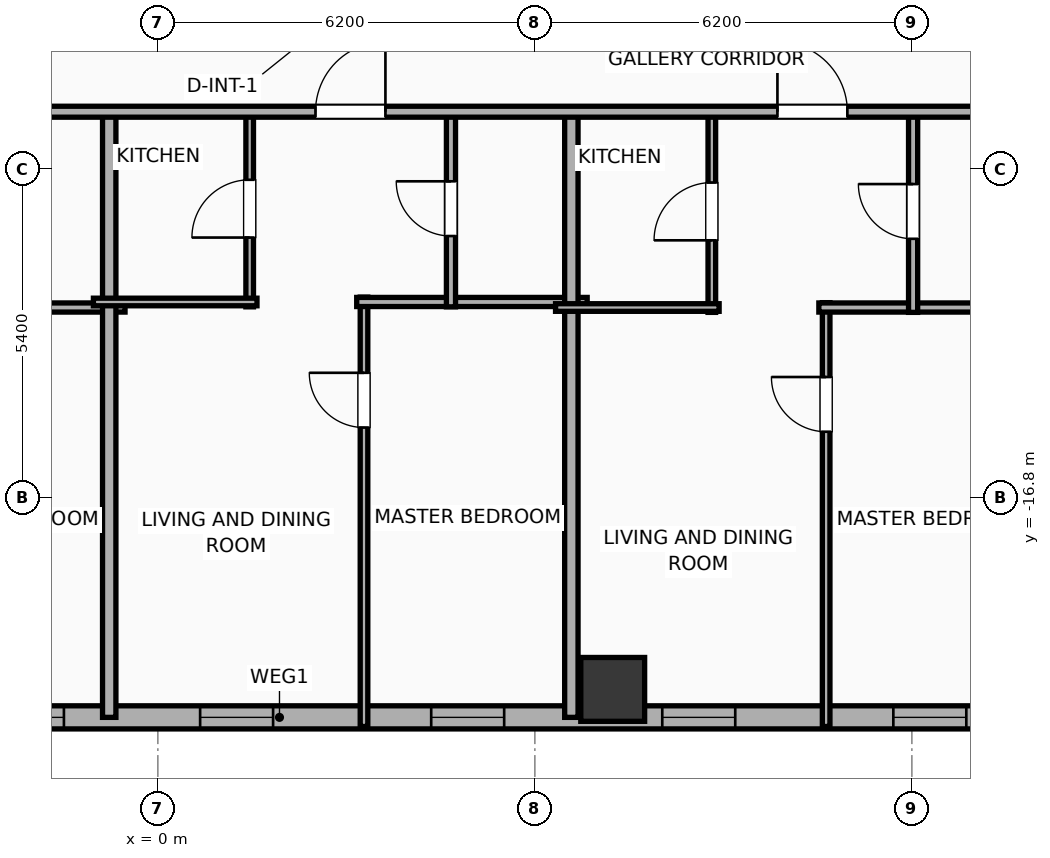
"""IFC4 building model, lengths in metres.
Left out: names, types, materials, properties, quantities, classifications, styles, units other than length and angle.
Written with IfcOpenShell. Run it as: python <this file> out.ifc"""

import sys

from ifc_helpers import new_model, si_unit, direction, frame, frame_2d, origin, origin_2d, place, context, subcontext, project, spatial, rectangle, hollow_rectangle, extrude, element, fill, save


model = new_model("IFC4")
c1 = context("Model", 3, precision=1e-05, world=origin(), true_north=direction((0.0, 1.0)))
c2 = subcontext(c1, "Body", "Model", "MODEL_VIEW")
j1 = project(units=[si_unit("LENGTHUNIT", "METRE"), si_unit("PLANEANGLEUNIT", "RADIAN")], contexts=[c1])
p1 = place(None, origin())
s1 = spatial("IfcSite", under=j1, at=p1, CompositionType="ELEMENT")
p2 = place(p1, origin())
s2 = spatial("IfcBuilding", under=s1, at=p2, CompositionType="ELEMENT")
p3 = place(p2, frame((0.0, 0.0, 93.6)))
s3 = spatial("IfcBuildingStorey", under=s2, at=p3, CompositionType="ELEMENT", Elevation=93.6)
p4 = place(p3, frame((7.48, -19.95, 0.0), z_axis=(0.0, 0.0, 1.0), x_axis=(1.0, 0.0, 0.0)))
e1 = element("IfcColumn", 1, at=p4, inside=s3, PredefinedType="COLUMN", context=c2, shape_type="SweptSolid", body=[
    extrude(hollow_rectangle(XDim=1.05, YDim=1.05, WallThickness=0.036, at=origin_2d()), origin(), (0.0, 0.0, 1.0), 3.9),
])
p5 = place(p3, frame((29.381, -20.41, 0.0), z_axis=(0.0, 0.0, 1.0), x_axis=(-1.0, 0.0, 0.0)))
e2 = element("IfcWall", 2, at=p5, inside=s3, PredefinedType="ELEMENTEDWALL", context=c2, shape_type="SweptSolid", body=[
    extrude(rectangle(XDim=54.763, YDim=0.38, at=frame_2d((27.381, 0.0))), origin(), (0.0, 0.0, 1.0), 3.65),
])
p6 = place(p5, frame((4.795, 0.0, 0.75)))
e3 = element("IfcOpeningElement", 3, at=p6, cuts=e2, PredefinedType="OPENING", context=c2, shape_type="SweptSolid", body=[
    extrude(rectangle(XDim=2.4, YDim=2.1, at=frame_2d((1.2, 1.05))), frame((0.0, 0.2, 0.0), z_axis=(0.0, -1.0, 0.0), x_axis=(1.0, 0.0, 0.0)), (0.0, 0.0, 1.0), 0.4),
])
p7 = place(p5, frame((33.877, 0.0, 0.75)))
e4 = element("IfcOpeningElement", 4, at=p7, cuts=e2, PredefinedType="OPENING", context=c2, shape_type="SweptSolid", body=[
    extrude(rectangle(XDim=2.4, YDim=2.1, at=frame_2d((1.2, 1.05))), frame((0.0, 0.2, 0.0), z_axis=(0.0, -1.0, 0.0), x_axis=(1.0, 0.0, 0.0)), (0.0, 0.0, 1.0), 0.4),
])
p8 = place(p5, frame((45.867, 0.0, 0.75)))
e5 = element("IfcOpeningElement", 5, at=p8, cuts=e2, PredefinedType="OPENING", context=c2, shape_type="SweptSolid", body=[
    extrude(rectangle(XDim=2.4, YDim=2.1, at=frame_2d((1.2, 1.05))), frame((0.0, 0.2, 0.0), z_axis=(0.0, -1.0, 0.0), x_axis=(1.0, 0.0, 0.0)), (0.0, 0.0, 1.0), 0.4),
])
p9 = place(p5, frame((53.122, 0.0, 0.75)))
e6 = element("IfcOpeningElement", 6, at=p9, cuts=e2, PredefinedType="OPENING", context=c2, shape_type="SweptSolid", body=[
    extrude(rectangle(XDim=0.85, YDim=2.05, at=frame_2d((0.425, 1.025))), frame((0.0, 0.2, 0.0), z_axis=(0.0, -1.0, 0.0), x_axis=(1.0, 0.0, 0.0)), (0.0, 0.0, 1.0), 0.4),
])
p10 = place(p5, frame((50.286, 0.0, 0.75)))
e7 = element("IfcOpeningElement", 7, at=p10, cuts=e2, PredefinedType="OPENING", context=c2, shape_type="SweptSolid", body=[
    extrude(rectangle(XDim=1.2, YDim=2.05, at=frame_2d((0.6, 1.025))), frame((0.0, 0.2, 0.0), z_axis=(0.0, -1.0, 0.0), x_axis=(1.0, 0.0, 0.0)), (0.0, 0.0, 1.0), 0.4),
])
p11 = place(p5, frame((41.846, 0.0, 0.75)))
e8 = element("IfcOpeningElement", 8, at=p11, cuts=e2, PredefinedType="OPENING", context=c2, shape_type="SweptSolid", body=[
    extrude(rectangle(XDim=1.2, YDim=2.05, at=frame_2d((0.6, 1.025))), frame((0.0, 0.2, 0.0), z_axis=(0.0, -1.0, 0.0), x_axis=(1.0, 0.0, 0.0)), (0.0, 0.0, 1.0), 0.4),
])
p12 = place(p5, frame((38.886, 0.0, 0.75)))
e9 = element("IfcOpeningElement", 9, at=p12, cuts=e2, PredefinedType="OPENING", context=c2, shape_type="SweptSolid", body=[
    extrude(rectangle(XDim=1.2, YDim=2.05, at=frame_2d((0.6, 1.025))), frame((0.0, 0.2, 0.0), z_axis=(0.0, -1.0, 0.0), x_axis=(1.0, 0.0, 0.0)), (0.0, 0.0, 1.0), 0.4),
])
p13 = place(p5, frame((30.926, 0.0, 0.75)))
e10 = element("IfcOpeningElement", 10, at=p13, cuts=e2, PredefinedType="OPENING", context=c2, shape_type="SweptSolid", body=[
    extrude(rectangle(XDim=1.2, YDim=2.05, at=frame_2d((0.6, 1.025))), frame((0.0, 0.2, 0.0), z_axis=(0.0, -1.0, 0.0), x_axis=(1.0, 0.0, 0.0)), (0.0, 0.0, 1.0), 0.4),
])
p14 = place(p5, frame((27.486, 0.0, 0.75)))
e11 = element("IfcOpeningElement", 11, at=p14, cuts=e2, PredefinedType="OPENING", context=c2, shape_type="SweptSolid", body=[
    extrude(rectangle(XDim=1.2, YDim=2.05, at=frame_2d((0.6, 1.025))), frame((0.0, 0.2, 0.0), z_axis=(0.0, -1.0, 0.0), x_axis=(1.0, 0.0, 0.0)), (0.0, 0.0, 1.0), 0.4),
])
p15 = place(p5, frame((23.686, 0.0, 0.75)))
e12 = element("IfcOpeningElement", 12, at=p15, cuts=e2, PredefinedType="OPENING", context=c2, shape_type="SweptSolid", body=[
    extrude(rectangle(XDim=1.2, YDim=2.05, at=frame_2d((0.6, 1.025))), frame((0.0, 0.2, 0.0), z_axis=(0.0, -1.0, 0.0), x_axis=(1.0, 0.0, 0.0)), (0.0, 0.0, 1.0), 0.4),
])
p16 = place(p5, frame((19.886, 0.0, 0.75)))
e13 = element("IfcOpeningElement", 13, at=p16, cuts=e2, PredefinedType="OPENING", context=c2, shape_type="SweptSolid", body=[
    extrude(rectangle(XDim=1.2, YDim=2.05, at=frame_2d((0.6, 1.025))), frame((0.0, 0.2, 0.0), z_axis=(0.0, -1.0, 0.0), x_axis=(1.0, 0.0, 0.0)), (0.0, 0.0, 1.0), 0.4),
])
p17 = place(p5, frame((16.086, 0.0, 0.75)))
e14 = element("IfcOpeningElement", 14, at=p17, cuts=e2, PredefinedType="OPENING", context=c2, shape_type="SweptSolid", body=[
    extrude(rectangle(XDim=1.2, YDim=2.05, at=frame_2d((0.6, 1.025))), frame((0.0, 0.2, 0.0), z_axis=(0.0, -1.0, 0.0), x_axis=(1.0, 0.0, 0.0)), (0.0, 0.0, 1.0), 0.4),
])
p18 = place(p5, frame((12.286, 0.0, 0.75)))
e15 = element("IfcOpeningElement", 15, at=p18, cuts=e2, PredefinedType="OPENING", context=c2, shape_type="SweptSolid", body=[
    extrude(rectangle(XDim=1.2, YDim=2.05, at=frame_2d((0.6, 1.025))), frame((0.0, 0.2, 0.0), z_axis=(0.0, -1.0, 0.0), x_axis=(1.0, 0.0, 0.0)), (0.0, 0.0, 1.0), 0.4),
])
p19 = place(p5, frame((8.486, 0.0, 0.75)))
e16 = element("IfcOpeningElement", 16, at=p19, cuts=e2, PredefinedType="OPENING", context=c2, shape_type="SweptSolid", body=[
    extrude(rectangle(XDim=1.2, YDim=2.05, at=frame_2d((0.6, 1.025))), frame((0.0, 0.2, 0.0), z_axis=(0.0, -1.0, 0.0), x_axis=(1.0, 0.0, 0.0)), (0.0, 0.0, 1.0), 0.4),
])
p20 = place(p5, frame((2.277, 0.0, 0.75)))
e17 = element("IfcOpeningElement", 17, at=p20, cuts=e2, PredefinedType="OPENING", context=c2, shape_type="SweptSolid", body=[
    extrude(rectangle(XDim=1.2, YDim=2.05, at=frame_2d((0.6, 1.025))), frame((0.0, 0.2, 0.0), z_axis=(0.0, -1.0, 0.0), x_axis=(1.0, 0.0, 0.0)), (0.0, 0.0, 1.0), 0.4),
])
p21 = place(p5, frame((1.071, 0.0, 0.75)))
e18 = element("IfcOpeningElement", 18, at=p21, cuts=e2, PredefinedType="OPENING", context=c2, shape_type="SweptSolid", body=[
    extrude(rectangle(XDim=0.52, YDim=2.05, at=frame_2d((0.26, 1.025))), frame((0.0, 0.2, 0.0), z_axis=(0.0, -1.0, 0.0), x_axis=(1.0, 0.0, 0.0)), (0.0, 0.0, 1.0), 0.4),
])
p22 = place(p3, frame((-4.33, -13.67, 0.0), z_axis=(0.0, 0.0, 1.0), x_axis=(1.0, 0.0, 0.0)))
e19 = element("IfcWall", 19, at=p22, inside=s3, PredefinedType="PLUMBINGWALL", context=c2, shape_type="SweptSolid", body=[
    extrude(rectangle(XDim=3.79, YDim=0.15, at=frame_2d((1.895, 0.0))), origin(), (0.0, 0.0, 1.0), 3.65),
])
p23 = place(p3, frame((-0.8, -20.41, 0.0), z_axis=(0.0, 0.0, 1.0), x_axis=(0.0, 1.0, 0.0)))
e20 = element("IfcWall", 20, at=p23, inside=s3, PredefinedType="PARTITIONING", context=c2, shape_type="SweptSolid", body=[
    extrude(rectangle(XDim=10.04, YDim=0.22, at=frame_2d((5.02, 0.0))), origin(), (0.0, 0.0, 1.0), 3.65),
])
p24 = place(p3, frame((3.39, -20.56, 0.0), z_axis=(0.0, 0.0, 1.0), x_axis=(0.0, 1.0, 0.0)))
e21 = element("IfcWall", 21, at=p24, inside=s3, PredefinedType="PARTITIONING", context=c2, shape_type="SweptSolid", body=[
    extrude(rectangle(XDim=7.061, YDim=0.125, at=frame_2d((3.531, 0.0))), origin(), (0.0, 0.0, 1.0), 3.65),
])
p25 = place(p24, frame((4.917, 0.0, 0.0)))
e22 = element("IfcOpeningElement", 22, at=p25, cuts=e21, PredefinedType="OPENING", context=c2, shape_type="SweptSolid", body=[
    extrude(rectangle(XDim=0.9, YDim=2.05, at=frame_2d((0.45, 1.025))), frame((0.0, 0.073, 0.0), z_axis=(0.0, -1.0, 0.0), x_axis=(1.0, 0.0, 0.0)), (0.0, 0.0, 1.0), 0.145),
])
p26 = place(p3, frame((3.27, -13.579, 0.0), z_axis=(0.0, 0.0, 1.0), x_axis=(1.0, 0.0, 0.0)))
e23 = element("IfcWall", 23, at=p26, inside=s3, PredefinedType="PLUMBINGWALL", context=c2, shape_type="SweptSolid", body=[
    extrude(rectangle(XDim=3.79, YDim=0.15, at=frame_2d((1.895, 0.0))), origin(), (0.0, 0.0, 1.0), 3.65),
])
p27 = place(p3, frame((1.51, -13.659, 0.0), z_axis=(0.0, 0.0, 1.0), x_axis=(0.0, 1.0, 0.0)))
e24 = element("IfcWall", 24, at=p27, inside=s3, PredefinedType="PARTITIONING", context=c2, shape_type="SweptSolid", body=[
    extrude(rectangle(XDim=3.229, YDim=0.125, at=frame_2d((1.615, 0.0))), origin(), (0.0, 0.0, 1.0), 3.65),
])
p28 = place(p27, frame((1.139, 0.0, 0.0)))
e25 = element("IfcOpeningElement", 25, at=p28, cuts=e24, PredefinedType="OPENING", context=c2, shape_type="SweptSolid", body=[
    extrude(rectangle(XDim=0.95, YDim=2.05, at=frame_2d((0.475, 1.025))), frame((0.0, 0.073, 0.0), z_axis=(0.0, -1.0, 0.0), x_axis=(1.0, 0.0, 0.0)), (0.0, 0.0, 1.0), 0.145),
])
p29 = place(p3, frame((-1.06, -13.579, 0.0), z_axis=(0.0, 0.0, 1.0), x_axis=(1.0, 0.0, 0.0)))
e26 = element("IfcWall", 26, at=p29, inside=s3, PredefinedType="PARTITIONING", context=c2, shape_type="SweptSolid", body=[
    extrude(rectangle(XDim=2.69, YDim=0.125, at=frame_2d((1.345, 0.0))), origin(), (0.0, 0.0, 1.0), 3.65),
])
p30 = place(p3, frame((4.82, -13.659, 0.0), z_axis=(0.0, 0.0, 1.0), x_axis=(0.0, 1.0, 0.0)))
e27 = element("IfcWall", 27, at=p30, inside=s3, PredefinedType="PLUMBINGWALL", context=c2, shape_type="SweptSolid", body=[
    extrude(rectangle(XDim=3.229, YDim=0.15, at=frame_2d((1.615, 0.0))), origin(), (0.0, 0.0, 1.0), 3.65),
])
p31 = place(p30, frame((1.165, 0.0, 0.0)))
e28 = element("IfcOpeningElement", 28, at=p31, cuts=e27, PredefinedType="OPENING", context=c2, shape_type="SweptSolid", body=[
    extrude(rectangle(XDim=0.9, YDim=2.05, at=frame_2d((0.45, 1.025))), frame((0.0, 0.085, 0.0), z_axis=(0.0, -1.0, 0.0), x_axis=(1.0, 0.0, 0.0)), (0.0, 0.0, 1.0), 0.17),
])
p32 = place(p3, frame((6.8, -20.41, 0.0), z_axis=(0.0, 0.0, 1.0), x_axis=(0.0, 1.0, 0.0)))
e29 = element("IfcWall", 29, at=p32, inside=s3, PredefinedType="PARTITIONING", context=c2, shape_type="SweptSolid", body=[
    extrude(rectangle(XDim=10.04, YDim=0.22, at=frame_2d((5.02, 0.0))), origin(), (0.0, 0.0, 1.0), 3.04),
])
p33 = place(p3, frame((10.99, -20.56, 0.0), z_axis=(0.0, 0.0, 1.0), x_axis=(0.0, 1.0, 0.0)))
e30 = element("IfcWall", 30, at=p33, inside=s3, PredefinedType="PARTITIONING", context=c2, shape_type="SweptSolid", body=[
    extrude(rectangle(XDim=6.97, YDim=0.125, at=frame_2d((3.485, 0.0))), origin(), (0.0, 0.0, 1.0), 3.65),
])
p34 = place(p33, frame((4.847, 0.0, 0.0)))
e31 = element("IfcOpeningElement", 31, at=p34, cuts=e30, PredefinedType="OPENING", context=c2, shape_type="SweptSolid", body=[
    extrude(rectangle(XDim=0.9, YDim=2.05, at=frame_2d((0.45, 1.025))), frame((0.0, 0.073, 0.0), z_axis=(0.0, -1.0, 0.0), x_axis=(1.0, 0.0, 0.0)), (0.0, 0.0, 1.0), 0.145),
])
p35 = place(p3, frame((10.87, -13.67, 0.0), z_axis=(0.0, 0.0, 1.0), x_axis=(1.0, 0.0, 0.0)))
e32 = element("IfcWall", 32, at=p35, inside=s3, PredefinedType="PLUMBINGWALL", context=c2, shape_type="SweptSolid", body=[
    extrude(rectangle(XDim=3.605, YDim=0.15, at=frame_2d((1.802, 0.0))), origin(), (0.0, 0.0, 1.0), 3.65),
])
p36 = place(p3, frame((9.11, -13.75, 0.0), z_axis=(0.0, 0.0, 1.0), x_axis=(0.0, 1.0, 0.0)))
e33 = element("IfcWall", 33, at=p36, inside=s3, PredefinedType="PARTITIONING", context=c2, shape_type="SweptSolid", body=[
    extrude(rectangle(XDim=3.32, YDim=0.125, at=frame_2d((1.66, 0.0))), origin(), (0.0, 0.0, 1.0), 3.65),
])
p37 = place(p36, frame((1.185, 0.0, 0.0)))
e34 = element("IfcOpeningElement", 34, at=p37, cuts=e33, PredefinedType="OPENING", context=c2, shape_type="SweptSolid", body=[
    extrude(rectangle(XDim=0.95, YDim=2.05, at=frame_2d((0.475, 1.025))), frame((0.0, 0.073, 0.0), z_axis=(0.0, -1.0, 0.0), x_axis=(1.0, 0.0, 0.0)), (0.0, 0.0, 1.0), 0.145),
])
p38 = place(p3, frame((6.54, -13.67, 0.0), z_axis=(0.0, 0.0, 1.0), x_axis=(1.0, 0.0, 0.0)))
e35 = element("IfcWall", 35, at=p38, inside=s3, PredefinedType="PARTITIONING", context=c2, shape_type="SweptSolid", body=[
    extrude(rectangle(XDim=2.69, YDim=0.125, at=frame_2d((1.345, 0.0))), origin(), (0.0, 0.0, 1.0), 3.65),
])
p39 = place(p3, frame((12.42, -13.75, 0.0), z_axis=(0.0, 0.0, 1.0), x_axis=(0.0, 1.0, 0.0)))
e36 = element("IfcWall", 36, at=p39, inside=s3, PredefinedType="PLUMBINGWALL", context=c2, shape_type="SweptSolid", body=[
    extrude(rectangle(XDim=3.32, YDim=0.15, at=frame_2d((1.66, 0.0))), origin(), (0.0, 0.0, 1.0), 3.65),
])
p40 = place(p39, frame((1.21, 0.0, 0.0)))
e37 = element("IfcOpeningElement", 37, at=p40, cuts=e36, PredefinedType="OPENING", context=c2, shape_type="SweptSolid", body=[
    extrude(rectangle(XDim=0.9, YDim=2.05, at=frame_2d((0.45, 1.025))), frame((0.0, 0.085, 0.0), z_axis=(0.0, -1.0, 0.0), x_axis=(1.0, 0.0, 0.0)), (0.0, 0.0, 1.0), 0.17),
])
p41 = place(p3, frame((-29.21, -10.45, 0.0), z_axis=(0.0, 0.0, 1.0), x_axis=(1.0, 0.0, 0.0)))
e38 = element("IfcWall", 38, at=p41, inside=s3, PredefinedType="PARTITIONING", context=c2, shape_type="SweptSolid", body=[
    extrude(rectangle(XDim=62.42, YDim=0.18, at=frame_2d((31.21, 0.0))), origin(), (0.0, 0.0, 1.0), 3.65),
])
p42 = place(p41, frame((2.502, 0.0, 0.0)))
e39 = element("IfcOpeningElement", 39, at=p42, cuts=e38, PredefinedType="OPENING", context=c2, shape_type="SweptSolid", body=[
    extrude(rectangle(XDim=0.9, YDim=2.05, at=frame_2d((0.45, 1.025))), frame((0.0, 0.1, 0.0), z_axis=(0.0, -1.0, 0.0), x_axis=(1.0, 0.0, 0.0)), (0.0, 0.0, 1.0), 0.2),
])
p43 = place(p41, frame((9.0, 0.0, 0.0)))
e40 = element("IfcOpeningElement", 40, at=p43, cuts=e38, PredefinedType="OPENING", context=c2, shape_type="SweptSolid", body=[
    extrude(rectangle(XDim=1.15, YDim=2.05, at=frame_2d((0.575, 1.025))), frame((0.0, 0.1, 0.0), z_axis=(0.0, -1.0, 0.0), x_axis=(1.0, 0.0, 0.0)), (0.0, 0.0, 1.0), 0.2),
])
p44 = place(p41, frame((16.603, 0.0, 0.0)))
e41 = element("IfcOpeningElement", 41, at=p44, cuts=e38, PredefinedType="OPENING", context=c2, shape_type="SweptSolid", body=[
    extrude(rectangle(XDim=1.15, YDim=2.05, at=frame_2d((0.575, 1.025))), frame((0.0, 0.1, 0.0), z_axis=(0.0, -1.0, 0.0), x_axis=(1.0, 0.0, 0.0)), (0.0, 0.0, 1.0), 0.2),
])
p45 = place(p41, frame((24.199, 0.0, 0.0)))
e42 = element("IfcOpeningElement", 42, at=p45, cuts=e38, PredefinedType="OPENING", context=c2, shape_type="SweptSolid", body=[
    extrude(rectangle(XDim=1.15, YDim=2.05, at=frame_2d((0.575, 1.025))), frame((0.0, 0.1, 0.0), z_axis=(0.0, -1.0, 0.0), x_axis=(1.0, 0.0, 0.0)), (0.0, 0.0, 1.0), 0.2),
])
p46 = place(p41, frame((31.802, 0.0, 0.0)))
e43 = element("IfcOpeningElement", 43, at=p46, cuts=e38, PredefinedType="OPENING", context=c2, shape_type="SweptSolid", body=[
    extrude(rectangle(XDim=1.15, YDim=2.05, at=frame_2d((0.575, 1.025))), frame((0.0, 0.1, 0.0), z_axis=(0.0, -1.0, 0.0), x_axis=(1.0, 0.0, 0.0)), (0.0, 0.0, 1.0), 0.2),
])
p47 = place(p41, frame((39.399, 0.0, 0.0)))
e44 = element("IfcOpeningElement", 44, at=p47, cuts=e38, PredefinedType="OPENING", context=c2, shape_type="SweptSolid", body=[
    extrude(rectangle(XDim=1.15, YDim=2.05, at=frame_2d((0.575, 1.025))), frame((0.0, 0.1, 0.0), z_axis=(0.0, -1.0, 0.0), x_axis=(1.0, 0.0, 0.0)), (0.0, 0.0, 1.0), 0.2),
])
p48 = place(p41, frame((47.001, 0.0, 0.0)))
e45 = element("IfcOpeningElement", 45, at=p48, cuts=e38, PredefinedType="OPENING", context=c2, shape_type="SweptSolid", body=[
    extrude(rectangle(XDim=1.15, YDim=2.05, at=frame_2d((0.575, 1.025))), frame((0.0, 0.1, 0.0), z_axis=(0.0, -1.0, 0.0), x_axis=(1.0, 0.0, 0.0)), (0.0, 0.0, 1.0), 0.2),
])
p49 = place(p41, frame((52.363, 0.0, 0.0)))
e46 = element("IfcOpeningElement", 46, at=p49, cuts=e38, PredefinedType="OPENING", context=c2, shape_type="SweptSolid", body=[
    extrude(rectangle(XDim=1.15, YDim=2.05, at=frame_2d((0.575, 1.025))), frame((0.0, 0.1, 0.0), z_axis=(0.0, -1.0, 0.0), x_axis=(1.0, 0.0, 0.0)), (0.0, 0.0, 1.0), 0.2),
])
p50 = place(p41, frame((59.386, 0.0, 0.0)))
e47 = element("IfcOpeningElement", 47, at=p50, cuts=e38, PredefinedType="OPENING", context=c2, shape_type="SweptSolid", body=[
    extrude(rectangle(XDim=0.9, YDim=2.05, at=frame_2d((0.45, 1.025))), frame((0.0, 0.1, 0.0), z_axis=(0.0, -1.0, 0.0), x_axis=(1.0, 0.0, 0.0)), (0.0, 0.0, 1.0), 0.2),
])
p51 = place(p13, origin())
e48 = element("IfcWindow", 48, at=p51, inside=s3, PartitioningType="SINGLE_PANEL", PredefinedType="WINDOW", context=c2, shape_type="SweptSolid", body=[
    extrude(rectangle(XDim=1.2, YDim=2.05, at=frame_2d((0.6, 1.025))), frame((0.0, 0.03, 0.0), z_axis=(0.0, -1.0, 0.0), x_axis=(1.0, 0.0, 0.0)), (0.0, 0.0, 1.0), 0.06),
])
fill(e10, e48)
p52 = place(p14, origin())
e49 = element("IfcWindow", 49, at=p52, inside=s3, PartitioningType="SINGLE_PANEL", PredefinedType="WINDOW", context=c2, shape_type="SweptSolid", body=[
    extrude(rectangle(XDim=1.2, YDim=2.05, at=frame_2d((0.6, 1.025))), frame((0.0, 0.03, 0.0), z_axis=(0.0, -1.0, 0.0), x_axis=(1.0, 0.0, 0.0)), (0.0, 0.0, 1.0), 0.06),
])
fill(e11, e49)
p53 = place(p15, origin())
e50 = element("IfcWindow", 50, at=p53, inside=s3, PartitioningType="SINGLE_PANEL", PredefinedType="WINDOW", context=c2, shape_type="SweptSolid", body=[
    extrude(rectangle(XDim=1.2, YDim=2.05, at=frame_2d((0.6, 1.025))), frame((0.0, 0.03, 0.0), z_axis=(0.0, -1.0, 0.0), x_axis=(1.0, 0.0, 0.0)), (0.0, 0.0, 1.0), 0.06),
])
fill(e12, e50)
p54 = place(p16, origin())
e51 = element("IfcWindow", 51, at=p54, inside=s3, PartitioningType="SINGLE_PANEL", PredefinedType="WINDOW", context=c2, shape_type="SweptSolid", body=[
    extrude(rectangle(XDim=1.2, YDim=2.05, at=frame_2d((0.6, 1.025))), frame((0.0, 0.03, 0.0), z_axis=(0.0, -1.0, 0.0), x_axis=(1.0, 0.0, 0.0)), (0.0, 0.0, 1.0), 0.06),
])
fill(e13, e51)
p55 = place(p17, origin())
e52 = element("IfcWindow", 52, at=p55, inside=s3, PartitioningType="SINGLE_PANEL", PredefinedType="WINDOW", context=c2, shape_type="SweptSolid", body=[
    extrude(rectangle(XDim=1.2, YDim=2.05, at=frame_2d((0.6, 1.025))), frame((0.0, 0.03, 0.0), z_axis=(0.0, -1.0, 0.0), x_axis=(1.0, 0.0, 0.0)), (0.0, 0.0, 1.0), 0.06),
])
fill(e14, e52)
p56 = place(p25, origin())
e53 = element("IfcDoor", 53, at=p56, inside=s3, OperationType="SINGLE_SWING_RIGHT", PredefinedType="DOOR", context=c2, shape_type="SweptSolid", body=[
    extrude(rectangle(XDim=0.9, YDim=2.05, at=frame_2d((0.45, 1.025))), frame((0.0, 0.025, 0.0), z_axis=(0.0, -1.0, 0.0), x_axis=(1.0, 0.0, 0.0)), (0.0, 0.0, 1.0), 0.05),
])
fill(e22, e53)
p57 = place(p28, origin())
e54 = element("IfcDoor", 54, at=p57, inside=s3, OperationType="SINGLE_SWING_LEFT", PredefinedType="DOOR", context=c2, shape_type="SweptSolid", body=[
    extrude(rectangle(XDim=0.95, YDim=2.05, at=frame_2d((0.475, 1.025))), frame((0.0, 0.025, 0.0), z_axis=(0.0, -1.0, 0.0), x_axis=(1.0, 0.0, 0.0)), (0.0, 0.0, 1.0), 0.05),
])
fill(e25, e54)
p58 = place(p31, origin())
e55 = element("IfcDoor", 55, at=p58, inside=s3, OperationType="SINGLE_SWING_RIGHT", PredefinedType="DOOR", context=c2, shape_type="SweptSolid", body=[
    extrude(rectangle(XDim=0.9, YDim=2.05, at=frame_2d((0.45, 1.025))), frame((0.0, 0.025, 0.0), z_axis=(0.0, -1.0, 0.0), x_axis=(1.0, 0.0, 0.0)), (0.0, 0.0, 1.0), 0.05),
])
fill(e28, e55)
p59 = place(p34, origin())
e56 = element("IfcDoor", 56, at=p59, inside=s3, OperationType="SINGLE_SWING_RIGHT", PredefinedType="DOOR", context=c2, shape_type="SweptSolid", body=[
    extrude(rectangle(XDim=0.9, YDim=2.05, at=frame_2d((0.45, 1.025))), frame((0.0, 0.025, 0.0), z_axis=(0.0, -1.0, 0.0), x_axis=(1.0, 0.0, 0.0)), (0.0, 0.0, 1.0), 0.05),
])
fill(e31, e56)
p60 = place(p37, origin())
e57 = element("IfcDoor", 57, at=p60, inside=s3, OperationType="SINGLE_SWING_LEFT", PredefinedType="DOOR", context=c2, shape_type="SweptSolid", body=[
    extrude(rectangle(XDim=0.95, YDim=2.05, at=frame_2d((0.475, 1.025))), frame((0.0, 0.025, 0.0), z_axis=(0.0, -1.0, 0.0), x_axis=(1.0, 0.0, 0.0)), (0.0, 0.0, 1.0), 0.05),
])
fill(e34, e57)
p61 = place(p40, origin())
e58 = element("IfcDoor", 58, at=p61, inside=s3, OperationType="SINGLE_SWING_RIGHT", PredefinedType="DOOR", context=c2, shape_type="SweptSolid", body=[
    extrude(rectangle(XDim=0.9, YDim=2.05, at=frame_2d((0.45, 1.025))), frame((0.0, 0.025, 0.0), z_axis=(0.0, -1.0, 0.0), x_axis=(1.0, 0.0, 0.0)), (0.0, 0.0, 1.0), 0.05),
])
fill(e37, e58)
p62 = place(p46, origin())
e59 = element("IfcDoor", 59, at=p62, inside=s3, OperationType="SINGLE_SWING_RIGHT", PredefinedType="DOOR", context=c2, shape_type="SweptSolid", body=[
    extrude(rectangle(XDim=1.15, YDim=2.05, at=frame_2d((0.575, 1.025))), frame((0.0, 0.025, 0.0), z_axis=(0.0, -1.0, 0.0), x_axis=(1.0, 0.0, 0.0)), (0.0, 0.0, 1.0), 0.05),
])
fill(e43, e59)
p63 = place(p47, origin())
e60 = element("IfcDoor", 60, at=p63, inside=s3, OperationType="SINGLE_SWING_LEFT", PredefinedType="DOOR", context=c2, shape_type="SweptSolid", body=[
    extrude(rectangle(XDim=1.15, YDim=2.05, at=frame_2d((0.575, 1.025))), frame((0.0, 0.025, 0.0), z_axis=(0.0, -1.0, 0.0), x_axis=(1.0, 0.0, 0.0)), (0.0, 0.0, 1.0), 0.05),
])
fill(e44, e60)
save(model, sys.argv[1])
